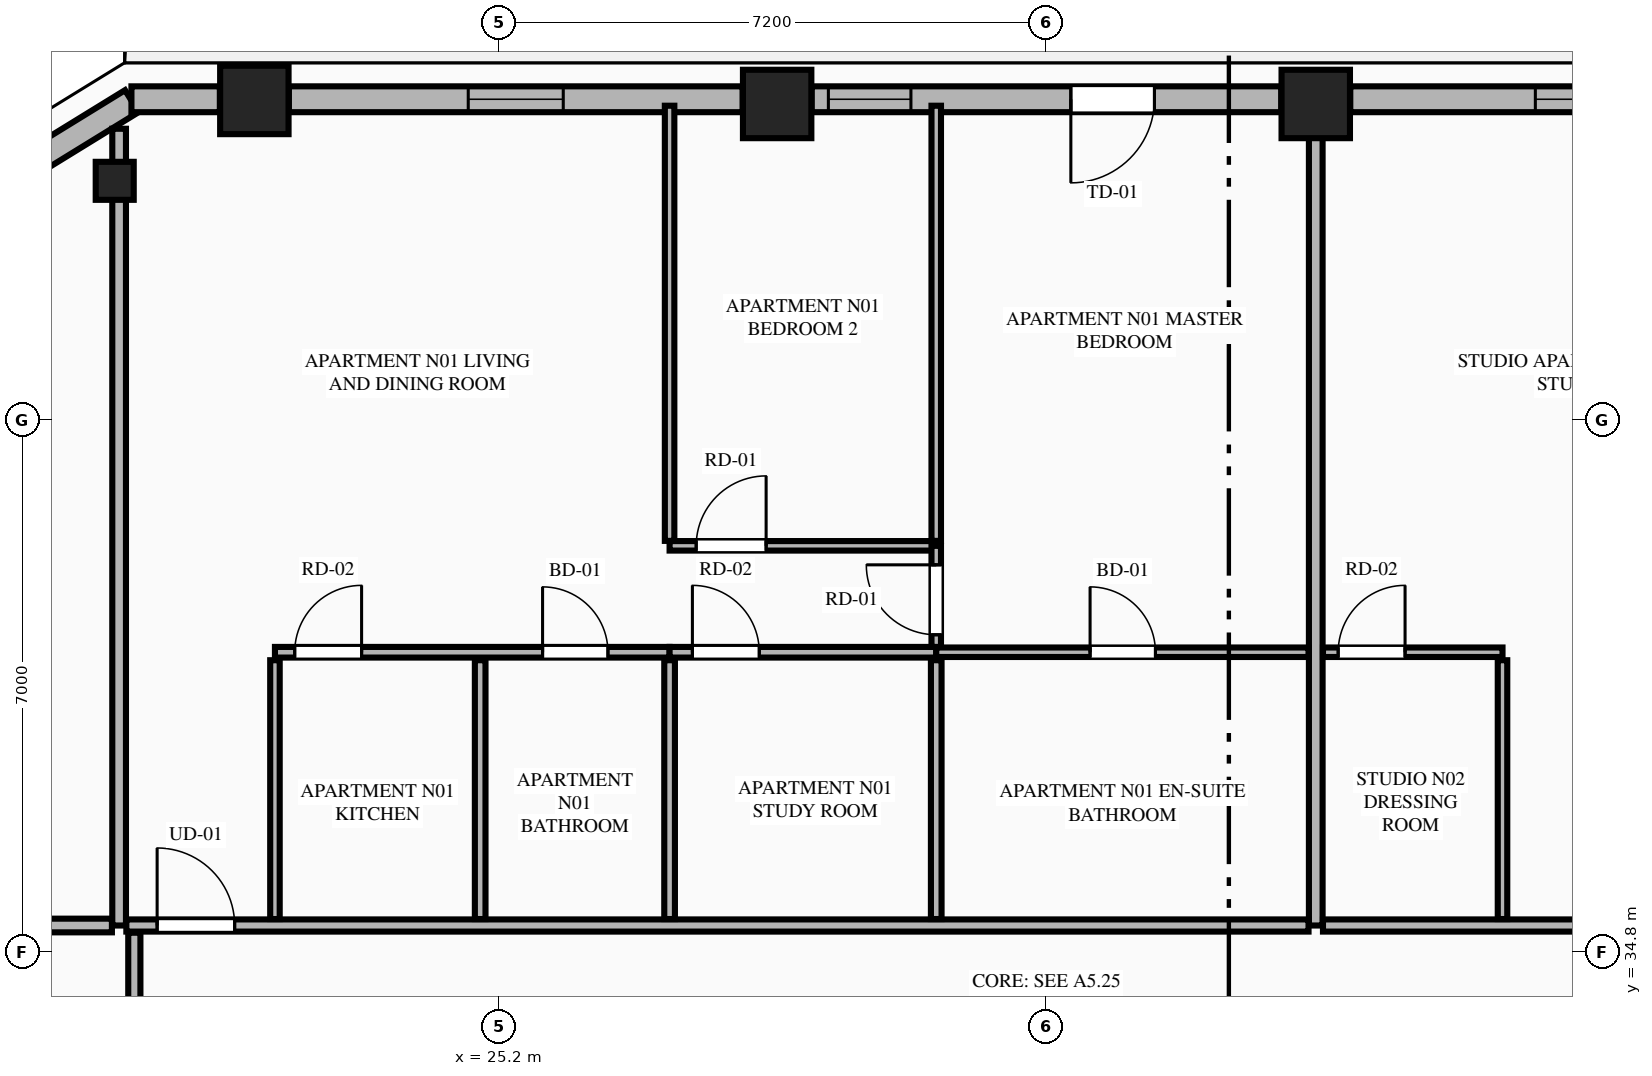
"""IFC4 building model, lengths in metres.
Left out: names, types, materials, properties, quantities, classifications, styles, units other than length and angle.
Written with IfcOpenShell. Run it as: python <this file> out.ifc"""

import sys

from ifc_helpers import new_model, si_unit, direction, frame, frame_2d, origin, origin_2d, place, context, subcontext, project, spatial, rectangle, extrude, element, fill, save


model = new_model("IFC4")
c1 = context("Model", 3, precision=1e-05, world=origin(), true_north=direction((0.0, 1.0)))
c2 = subcontext(c1, "Body", "Model", "MODEL_VIEW")
j1 = project(units=[si_unit("LENGTHUNIT", "METRE"), si_unit("PLANEANGLEUNIT", "RADIAN")], contexts=[c1])
p1 = place(None, origin())
s1 = spatial("IfcSite", under=j1, at=p1, CompositionType="ELEMENT")
p2 = place(p1, origin())
s2 = spatial("IfcBuilding", under=s1, at=p2, CompositionType="ELEMENT")
p3 = place(p2, frame((0.0, 0.0, 182.55)))
s3 = spatial("IfcBuildingStorey", under=s2, at=p3, CompositionType="ELEMENT", Elevation=182.55)
for number, where, z_axis, x_axis in (
    (1, (35.943, 45.958, 0.0), (0.0, 0.0, 1.0), (1.0, 0.0, 0.0)),
    (2, (28.857, 45.958, 0.0), (0.0, 0.0, 1.0), (1.0, 0.0, 0.0)),
    (3, (21.979, 46.011, 0.0), (0.0, 0.0, 1.0), (1.0, 0.0, 0.0)),
):
    element("IfcColumn", number, at=place(p3, frame(where, z_axis=z_axis, x_axis=x_axis)), inside=s3, PredefinedType="COLUMN", context=c2, shape_type="SweptSolid", body=[
        extrude(rectangle(XDim=0.9, YDim=0.9, at=origin_2d()), origin(), (0.0, 0.0, 1.0), 3.55),
    ])
p4 = place(p3, frame((20.142, 44.947, 0.0), z_axis=(0.0, 0.0, 1.0), x_axis=(-0.865230187018, -0.501374833306, 0.0)))
e4 = element("IfcColumn", 4, at=p4, inside=s3, PredefinedType="PILASTER", context=c2, shape_type="SweptSolid", body=[
    extrude(rectangle(XDim=0.5, YDim=0.35, at=origin_2d()), origin(), (0.0, 0.0, 1.0), 3.55),
])
p5 = place(p3, frame((20.367, 45.995, 0.0), z_axis=(0.0, 0.0, 1.0), x_axis=(-0.851713271379, -0.524008113828, 0.0)))
e5 = element("IfcWall", 5, at=p5, inside=s3, PredefinedType="STANDARD", context=c2, shape_type="SweptSolid", body=[
    extrude(rectangle(XDim=1.678, YDim=0.34, at=frame_2d((0.839, 0.0))), origin(), (0.0, 0.0, 1.0), 3.35),
])
p6 = place(p3, frame((42.367, 46.02, 0.0), z_axis=(0.0, 0.0, 1.0), x_axis=(-1.0, 0.0, 0.0)))
e6 = element("IfcWall", 6, at=p6, inside=s3, PredefinedType="STANDARD", context=c2, shape_type="SweptSolid", body=[
    extrude(rectangle(XDim=5.97, YDim=0.34, at=frame_2d((2.985, 0.0))), origin(), (0.0, 0.0, 1.0), 2.883),
])
p7 = place(p6, frame((2.435, 0.0, 0.75)))
e7 = element("IfcOpeningElement", 7, at=p7, cuts=e6, PredefinedType="OPENING", context=c2, shape_type="SweptSolid", body=[
    extrude(rectangle(XDim=1.1, YDim=1.983, at=frame_2d((0.55, 0.991))), frame((0.0, 0.18, 0.0), z_axis=(0.0, -1.0, 0.0), x_axis=(1.0, 0.0, 0.0)), (0.0, 0.0, 1.0), 0.36),
])
p8 = place(p3, frame((35.489, 46.02, 0.0), z_axis=(0.0, 0.0, 1.0), x_axis=(-1.0, 0.0, 0.0)))
e8 = element("IfcWall", 8, at=p8, inside=s3, PredefinedType="STANDARD", context=c2, shape_type="SweptSolid", body=[
    extrude(rectangle(XDim=6.178, YDim=0.34, at=frame_2d((3.089, 0.0))), origin(), (0.0, 0.0, 1.0), 2.883),
])
p9 = place(p8, frame((1.668, 0.0, 0.0)))
e9 = element("IfcOpeningElement", 9, at=p9, cuts=e8, PredefinedType="OPENING", context=c2, shape_type="SweptSolid", body=[
    extrude(rectangle(XDim=1.1, YDim=2.25, at=frame_2d((0.55, 1.125))), frame((0.0, 0.18, 0.0), z_axis=(0.0, -1.0, 0.0), x_axis=(1.0, 0.0, 0.0)), (0.0, 0.0, 1.0), 0.36),
])
p10 = place(p8, frame((4.872, 0.0, 0.75)))
e10 = element("IfcOpeningElement", 10, at=p10, cuts=e8, PredefinedType="OPENING", context=c2, shape_type="SweptSolid", body=[
    extrude(rectangle(XDim=1.086, YDim=1.983, at=frame_2d((0.543, 0.991))), frame((0.0, 0.18, 0.0), z_axis=(0.0, -1.0, 0.0), x_axis=(1.0, 0.0, 0.0)), (0.0, 0.0, 1.0), 0.36),
])
p11 = place(p3, frame((28.403, 46.02, 0.0), z_axis=(0.0, 0.0, 1.0), x_axis=(-1.0, 0.0, 0.0)))
e11 = element("IfcWall", 11, at=p11, inside=s3, PredefinedType="STANDARD", context=c2, shape_type="SweptSolid", body=[
    extrude(rectangle(XDim=5.97, YDim=0.34, at=frame_2d((2.985, 0.0))), origin(), (0.0, 0.0, 1.0), 2.883),
])
p12 = place(p11, frame((2.36, 0.0, 0.75)))
e12 = element("IfcOpeningElement", 12, at=p12, cuts=e11, PredefinedType="OPENING", context=c2, shape_type="SweptSolid", body=[
    extrude(rectangle(XDim=1.25, YDim=1.95, at=frame_2d((0.625, 0.975))), frame((0.0, 0.18, 0.0), z_axis=(0.0, -1.0, 0.0), x_axis=(1.0, 0.0, 0.0)), (0.0, 0.0, 1.0), 0.36),
])
p13 = place(p3, frame((21.525, 46.02, 0.0), z_axis=(0.0, 0.0, 1.0), x_axis=(-1.0, 0.0, 0.0)))
e13 = element("IfcWall", 13, at=p13, inside=s3, PredefinedType="STANDARD", context=c2, shape_type="SweptSolid", body=[
    extrude(rectangle(XDim=1.163, YDim=0.34, at=frame_2d((0.582, 0.0))), origin(), (0.0, 0.0, 1.0), 3.35),
])
p14 = place(p3, frame((20.2, 35.15, 0.0), z_axis=(0.0, 0.0, 1.0), x_axis=(0.0, 1.0, 0.0)))
e14 = element("IfcWall", 14, at=p14, inside=s3, PredefinedType="PARTITIONING", context=c2, shape_type="SweptSolid", body=[
    extrude(rectangle(XDim=10.482, YDim=0.18, at=frame_2d((5.241, 0.0))), origin(), (0.0, 0.0, 1.0), 3.35),
])
p15 = place(p3, frame((35.943, 35.15, 0.0), z_axis=(0.0, 0.0, 1.0), x_axis=(0.0, 1.0, 0.0)))
e15 = element("IfcWall", 15, at=p15, inside=s3, PredefinedType="PARTITIONING", context=c2, shape_type="SweptSolid", body=[
    extrude(rectangle(XDim=10.695, YDim=0.18, at=frame_2d((5.348, 0.0))), origin(), (0.0, 0.0, 1.0), 2.807),
])
p16 = place(p3, frame((20.295, 35.15, 0.0), z_axis=(0.0, 0.0, 1.0), x_axis=(1.0, 0.0, 0.0)))
e16 = element("IfcWall", 16, at=p16, inside=s3, PredefinedType="PARTITIONING", context=c2, shape_type="SweptSolid", body=[
    extrude(rectangle(XDim=15.553, YDim=0.16, at=frame_2d((7.776, 0.0))), origin(), (0.0, 0.0, 1.0), 3.35),
])
p17 = place(p16, frame((0.405, 0.0, 0.0)))
e17 = element("IfcOpeningElement", 17, at=p17, cuts=e16, PredefinedType="OPENING", context=c2, shape_type="SweptSolid", body=[
    extrude(rectangle(XDim=1.02, YDim=2.25, at=frame_2d((0.51, 1.125))), frame((0.0, 0.09, 0.0), z_axis=(0.0, -1.0, 0.0), x_axis=(1.0, 0.0, 0.0)), (0.0, 0.0, 1.0), 0.18),
])
p18 = place(p3, frame((22.25, 35.235, 0.0), z_axis=(0.0, 0.0, 1.0), x_axis=(0.0, 1.0, 0.0)))
e18 = element("IfcWall", 18, at=p18, inside=s3, PredefinedType="PARTITIONING", context=c2, shape_type="SweptSolid", body=[
    extrude(rectangle(XDim=3.405, YDim=0.125, at=frame_2d((1.702, 0.0))), origin(), (0.0, 0.0, 1.0), 2.807),
])
p19 = place(p3, frame((22.25, 38.745, 0.0), z_axis=(0.0, 0.0, 1.0), x_axis=(1.0, 0.0, 0.0)))
e19 = element("IfcWall", 19, at=p19, inside=s3, PredefinedType="PLUMBINGWALL", context=c2, shape_type="SweptSolid", body=[
    extrude(rectangle(XDim=5.192, YDim=0.14, at=frame_2d((2.596, 0.0))), origin(), (0.0, 0.0, 1.0), 3.35),
])
p20 = place(p19, frame((3.521, 0.0, 0.0)))
e20 = element("IfcOpeningElement", 20, at=p20, cuts=e19, PredefinedType="OPENING", context=c2, shape_type="SweptSolid", body=[
    extrude(rectangle(XDim=0.86, YDim=2.1, at=frame_2d((0.43, 1.05))), frame((0.0, 0.08, 0.0), z_axis=(0.0, -1.0, 0.0), x_axis=(1.0, 0.0, 0.0)), (0.0, 0.0, 1.0), 0.16),
])
p21 = place(p19, frame((0.26, 0.0, 0.0)))
e21 = element("IfcOpeningElement", 21, at=p21, cuts=e19, PredefinedType="OPENING", context=c2, shape_type="SweptSolid", body=[
    extrude(rectangle(XDim=0.88, YDim=2.15, at=frame_2d((0.44, 1.075))), frame((0.0, 0.08, 0.0), z_axis=(0.0, -1.0, 0.0), x_axis=(1.0, 0.0, 0.0)), (0.0, 0.0, 1.0), 0.16),
])
p22 = place(p3, frame((27.442, 38.745, 0.0), z_axis=(0.0, 0.0, 1.0), x_axis=(1.0, 0.0, 0.0)))
e22 = element("IfcWall", 22, at=p22, inside=s3, PredefinedType="PLUMBINGWALL", context=c2, shape_type="SweptSolid", body=[
    extrude(rectangle(XDim=3.508, YDim=0.14, at=frame_2d((1.754, 0.0))), origin(), (0.0, 0.0, 1.0), 3.35),
])
p23 = place(p22, frame((0.3, 0.0, 0.0)))
e23 = element("IfcOpeningElement", 23, at=p23, cuts=e22, PredefinedType="OPENING", context=c2, shape_type="SweptSolid", body=[
    extrude(rectangle(XDim=0.88, YDim=2.15, at=frame_2d((0.44, 1.075))), frame((0.0, 0.08, 0.0), z_axis=(0.0, -1.0, 0.0), x_axis=(1.0, 0.0, 0.0)), (0.0, 0.0, 1.0), 0.16),
])
p24 = place(p3, frame((30.95, 38.745, 0.0), z_axis=(0.0, 0.0, 1.0), x_axis=(1.0, 0.0, 0.0)))
e24 = element("IfcWall", 24, at=p24, inside=s3, PredefinedType="PARTITIONING", context=c2, shape_type="SweptSolid", body=[
    extrude(rectangle(XDim=4.898, YDim=0.125, at=frame_2d((2.449, 0.0))), origin(), (0.0, 0.0, 1.0), 3.35),
])
p25 = place(p24, frame((2.024, 0.0, 0.0)))
e25 = element("IfcOpeningElement", 25, at=p25, cuts=e24, PredefinedType="OPENING", context=c2, shape_type="SweptSolid", body=[
    extrude(rectangle(XDim=0.86, YDim=2.1, at=frame_2d((0.43, 1.05))), frame((0.0, 0.073, 0.0), z_axis=(0.0, -1.0, 0.0), x_axis=(1.0, 0.0, 0.0)), (0.0, 0.0, 1.0), 0.145),
])
p26 = place(p3, frame((24.95, 35.235, 0.0), z_axis=(0.0, 0.0, 1.0), x_axis=(0.0, 1.0, 0.0)))
e26 = element("IfcWall", 26, at=p26, inside=s3, PredefinedType="PLUMBINGWALL", context=c2, shape_type="SweptSolid", body=[
    extrude(rectangle(XDim=3.405, YDim=0.14, at=frame_2d((1.702, 0.0))), origin(), (0.0, 0.0, 1.0), 3.35),
])
p27 = place(p3, frame((27.442, 40.21, 0.0), z_axis=(0.0, 0.0, 1.0), x_axis=(0.0, 1.0, 0.0)))
e27 = element("IfcWall", 27, at=p27, inside=s3, PredefinedType="PARTITIONING", context=c2, shape_type="SweptSolid", body=[
    extrude(rectangle(XDim=5.725, YDim=0.125, at=frame_2d((2.863, 0.0))), origin(), (0.0, 0.0, 1.0), 3.35),
])
p28 = place(p3, frame((27.442, 40.145, 0.0), z_axis=(0.0, 0.0, 1.0), x_axis=(1.0, 0.0, 0.0)))
e28 = element("IfcWall", 28, at=p28, inside=s3, PredefinedType="PARTITIONING", context=c2, shape_type="SweptSolid", body=[
    extrude(rectangle(XDim=3.508, YDim=0.125, at=frame_2d((1.754, 0.0))), origin(), (0.0, 0.0, 1.0), 3.35),
])
p29 = place(p28, frame((0.35, 0.0, 0.0)))
e29 = element("IfcOpeningElement", 29, at=p29, cuts=e28, PredefinedType="OPENING", context=c2, shape_type="SweptSolid", body=[
    extrude(rectangle(XDim=0.92, YDim=2.15, at=frame_2d((0.46, 1.075))), frame((0.0, 0.073, 0.0), z_axis=(0.0, -1.0, 0.0), x_axis=(1.0, 0.0, 0.0)), (0.0, 0.0, 1.0), 0.145),
])
p30 = place(p3, frame((30.95, 38.815, 0.0), z_axis=(0.0, 0.0, 1.0), x_axis=(0.0, 1.0, 0.0)))
e30 = element("IfcWall", 30, at=p30, inside=s3, PredefinedType="PARTITIONING", context=c2, shape_type="SweptSolid", body=[
    extrude(rectangle(XDim=1.33, YDim=0.125, at=frame_2d((0.665, 0.0))), origin(), (0.0, 0.0, 1.0), 3.35),
])
p31 = place(p30, frame((0.16, 0.0, 0.0)))
e31 = element("IfcOpeningElement", 31, at=p31, cuts=e30, PredefinedType="OPENING", context=c2, shape_type="SweptSolid", body=[
    extrude(rectangle(XDim=0.92, YDim=2.15, at=frame_2d((0.46, 1.075))), frame((0.0, 0.073, 0.0), z_axis=(0.0, -1.0, 0.0), x_axis=(1.0, 0.0, 0.0)), (0.0, 0.0, 1.0), 0.145),
])
for number, where, z_axis, x_axis in (
    (32, (27.442, 35.235, 0.0), (0.0, 0.0, 1.0), (0.0, 1.0, 0.0)),
    (33, (30.95, 35.235, 0.0), (0.0, 0.0, 1.0), (0.0, 1.0, 0.0)),
):
    element("IfcWall", number, at=place(p3, frame(where, z_axis=z_axis, x_axis=x_axis)), inside=s3, PredefinedType="PLUMBINGWALL", context=c2, shape_type="SweptSolid", body=[
        extrude(rectangle(XDim=3.405, YDim=0.14, at=frame_2d((1.702, 0.0))), origin(), (0.0, 0.0, 1.0), 3.35),
    ])
p32 = place(p3, frame((30.95, 40.21, 0.0), z_axis=(0.0, 0.0, 1.0), x_axis=(0.0, 1.0, 0.0)))
e34 = element("IfcWall", 34, at=p32, inside=s3, PredefinedType="PARTITIONING", context=c2, shape_type="SweptSolid", body=[
    extrude(rectangle(XDim=5.725, YDim=0.125, at=frame_2d((2.863, 0.0))), origin(), (0.0, 0.0, 1.0), 3.35),
])
p33 = place(p3, frame((36.038, 35.15, 0.0), z_axis=(0.0, 0.0, 1.0), x_axis=(1.0, 0.0, 0.0)))
e35 = element("IfcWall", 35, at=p33, inside=s3, PredefinedType="PARTITIONING", context=c2, shape_type="SweptSolid", body=[
    extrude(rectangle(XDim=8.467, YDim=0.16, at=frame_2d((4.233, 0.0))), origin(), (0.0, 0.0, 1.0), 3.35),
])
p34 = place(p33, frame((6.212, 0.0, 0.0)))
e36 = element("IfcOpeningElement", 36, at=p34, cuts=e35, PredefinedType="OPENING", context=c2, shape_type="SweptSolid", body=[
    extrude(rectangle(XDim=1.02, YDim=2.25, at=frame_2d((0.51, 1.125))), frame((0.0, 0.09, 0.0), z_axis=(0.0, -1.0, 0.0), x_axis=(1.0, 0.0, 0.0)), (0.0, 0.0, 1.0), 0.18),
])
p35 = place(p3, frame((38.4, 35.235, 0.0), z_axis=(0.0, 0.0, 1.0), x_axis=(0.0, 1.0, 0.0)))
e37 = element("IfcWall", 37, at=p35, inside=s3, PredefinedType="PARTITIONING", context=c2, shape_type="SweptSolid", body=[
    extrude(rectangle(XDim=3.405, YDim=0.125, at=frame_2d((1.702, 0.0))), origin(), (0.0, 0.0, 1.0), 3.35),
])
p36 = place(p3, frame((36.038, 38.745, 0.0), z_axis=(0.0, 0.0, 1.0), x_axis=(1.0, 0.0, 0.0)))
e38 = element("IfcWall", 38, at=p36, inside=s3, PredefinedType="PARTITIONING", context=c2, shape_type="SweptSolid", body=[
    extrude(rectangle(XDim=2.362, YDim=0.125, at=frame_2d((1.181, 0.0))), origin(), (0.0, 0.0, 1.0), 3.35),
])
p37 = place(p36, frame((0.2, 0.0, 0.0)))
e39 = element("IfcOpeningElement", 39, at=p37, cuts=e38, PredefinedType="OPENING", context=c2, shape_type="SweptSolid", body=[
    extrude(rectangle(XDim=0.88, YDim=2.15, at=frame_2d((0.44, 1.075))), frame((0.0, 0.073, 0.0), z_axis=(0.0, -1.0, 0.0), x_axis=(1.0, 0.0, 0.0)), (0.0, 0.0, 1.0), 0.145),
])
p38 = place(p3, frame((14.11, 35.15, 0.0), z_axis=(0.0, 0.0, 1.0), x_axis=(1.0, 0.0, 0.0)))
e40 = element("IfcWall", 40, at=p38, inside=s3, PredefinedType="PARTITIONING", context=c2, shape_type="SweptSolid", body=[
    extrude(rectangle(XDim=5.995, YDim=0.18, at=frame_2d((2.998, 0.0))), origin(), (0.0, 0.0, 1.0), 3.35),
])
p39 = place(p3, frame((20.4, 16.345, 0.0), z_axis=(0.0, 0.0, 1.0), x_axis=(0.0, 1.0, 0.0)))
e41 = element("IfcWall", 41, at=p39, inside=s3, PredefinedType="PARTITIONING", context=c2, shape_type="SweptSolid", body=[
    extrude(rectangle(XDim=18.71, YDim=0.16, at=frame_2d((9.355, 0.0))), origin(), (0.0, 0.0, 1.0), 3.35),
])
p40 = place(p39, frame((0.45, 0.0, 0.0)))
e42 = element("IfcOpeningElement", 42, at=p40, cuts=e41, PredefinedType="OPENING", context=c2, shape_type="SweptSolid", body=[
    extrude(rectangle(XDim=1.02, YDim=2.25, at=frame_2d((0.51, 1.125))), frame((0.0, 0.09, 0.0), z_axis=(0.0, -1.0, 0.0), x_axis=(1.0, 0.0, 0.0)), (0.0, 0.0, 1.0), 0.18),
])
p41 = place(p7, origin())
e43 = element("IfcWindow", 43, at=p41, inside=s3, PartitioningType="SINGLE_PANEL", PredefinedType="WINDOW", context=c2, shape_type="SweptSolid", body=[
    extrude(rectangle(XDim=1.1, YDim=1.983, at=frame_2d((0.55, 0.991))), frame((0.0, 0.03, 0.0), z_axis=(0.0, -1.0, 0.0), x_axis=(1.0, 0.0, 0.0)), (0.0, 0.0, 1.0), 0.06),
])
fill(e7, e43)
p42 = place(p9, origin())
e44 = element("IfcDoor", 44, at=p42, inside=s3, OperationType="SINGLE_SWING_RIGHT", PredefinedType="DOOR", context=c2, shape_type="SweptSolid", body=[
    extrude(rectangle(XDim=1.1, YDim=2.25, at=frame_2d((0.55, 1.125))), frame((0.0, 0.025, 0.0), z_axis=(0.0, -1.0, 0.0), x_axis=(1.0, 0.0, 0.0)), (0.0, 0.0, 1.0), 0.05),
])
fill(e9, e44)
p43 = place(p12, origin())
e45 = element("IfcWindow", 45, at=p43, inside=s3, PartitioningType="SINGLE_PANEL", PredefinedType="WINDOW", context=c2, shape_type="SweptSolid", body=[
    extrude(rectangle(XDim=1.25, YDim=1.95, at=frame_2d((0.625, 0.975))), frame((0.0, 0.03, 0.0), z_axis=(0.0, -1.0, 0.0), x_axis=(1.0, 0.0, 0.0)), (0.0, 0.0, 1.0), 0.06),
])
fill(e12, e45)
p44 = place(p20, origin())
e46 = element("IfcDoor", 46, at=p44, inside=s3, OperationType="SINGLE_SWING_LEFT", PredefinedType="DOOR", context=c2, shape_type="SweptSolid", body=[
    extrude(rectangle(XDim=0.86, YDim=2.1, at=frame_2d((0.43, 1.05))), frame((0.0, 0.025, 0.0), z_axis=(0.0, -1.0, 0.0), x_axis=(1.0, 0.0, 0.0)), (0.0, 0.0, 1.0), 0.05),
])
fill(e20, e46)
p45 = place(p25, origin())
e47 = element("IfcDoor", 47, at=p45, inside=s3, OperationType="SINGLE_SWING_LEFT", PredefinedType="DOOR", context=c2, shape_type="SweptSolid", body=[
    extrude(rectangle(XDim=0.86, YDim=2.1, at=frame_2d((0.43, 1.05))), frame((0.0, 0.025, 0.0), z_axis=(0.0, -1.0, 0.0), x_axis=(1.0, 0.0, 0.0)), (0.0, 0.0, 1.0), 0.05),
])
fill(e25, e47)
p46 = place(p17, origin())
e48 = element("IfcDoor", 48, at=p46, inside=s3, OperationType="SINGLE_SWING_LEFT", PredefinedType="DOOR", context=c2, shape_type="SweptSolid", body=[
    extrude(rectangle(XDim=1.02, YDim=2.25, at=frame_2d((0.51, 1.125))), frame((0.0, 0.025, 0.0), z_axis=(0.0, -1.0, 0.0), x_axis=(1.0, 0.0, 0.0)), (0.0, 0.0, 1.0), 0.05),
])
fill(e17, e48)
p47 = place(p21, origin())
e49 = element("IfcDoor", 49, at=p47, inside=s3, OperationType="SINGLE_SWING_RIGHT", PredefinedType="DOOR", context=c2, shape_type="SweptSolid", body=[
    extrude(rectangle(XDim=0.88, YDim=2.15, at=frame_2d((0.44, 1.075))), frame((0.0, 0.025, 0.0), z_axis=(0.0, -1.0, 0.0), x_axis=(1.0, 0.0, 0.0)), (0.0, 0.0, 1.0), 0.05),
])
fill(e21, e49)
p48 = place(p23, origin())
e50 = element("IfcDoor", 50, at=p48, inside=s3, OperationType="SINGLE_SWING_LEFT", PredefinedType="DOOR", context=c2, shape_type="SweptSolid", body=[
    extrude(rectangle(XDim=0.88, YDim=2.15, at=frame_2d((0.44, 1.075))), frame((0.0, 0.025, 0.0), z_axis=(0.0, -1.0, 0.0), x_axis=(1.0, 0.0, 0.0)), (0.0, 0.0, 1.0), 0.05),
])
fill(e23, e50)
p49 = place(p29, origin())
e51 = element("IfcDoor", 51, at=p49, inside=s3, OperationType="SINGLE_SWING_RIGHT", PredefinedType="DOOR", context=c2, shape_type="SweptSolid", body=[
    extrude(rectangle(XDim=0.92, YDim=2.15, at=frame_2d((0.46, 1.075))), frame((0.0, 0.025, 0.0), z_axis=(0.0, -1.0, 0.0), x_axis=(1.0, 0.0, 0.0)), (0.0, 0.0, 1.0), 0.05),
])
fill(e29, e51)
p50 = place(p31, origin())
e52 = element("IfcDoor", 52, at=p50, inside=s3, OperationType="SINGLE_SWING_RIGHT", PredefinedType="DOOR", context=c2, shape_type="SweptSolid", body=[
    extrude(rectangle(XDim=0.92, YDim=2.15, at=frame_2d((0.46, 1.075))), frame((0.0, 0.025, 0.0), z_axis=(0.0, -1.0, 0.0), x_axis=(1.0, 0.0, 0.0)), (0.0, 0.0, 1.0), 0.05),
])
fill(e31, e52)
p51 = place(p37, origin())
e53 = element("IfcDoor", 53, at=p51, inside=s3, OperationType="SINGLE_SWING_RIGHT", PredefinedType="DOOR", context=c2, shape_type="SweptSolid", body=[
    extrude(rectangle(XDim=0.88, YDim=2.15, at=frame_2d((0.44, 1.075))), frame((0.0, 0.025, 0.0), z_axis=(0.0, -1.0, 0.0), x_axis=(1.0, 0.0, 0.0)), (0.0, 0.0, 1.0), 0.05),
])
fill(e39, e53)
p52 = place(p10, origin())
e54 = element("IfcWindow", 54, at=p52, inside=s3, PartitioningType="SINGLE_PANEL", PredefinedType="WINDOW", context=c2, shape_type="SweptSolid", body=[
    extrude(rectangle(XDim=1.086, YDim=1.983, at=frame_2d((0.543, 0.991))), frame((0.0, 0.03, 0.0), z_axis=(0.0, -1.0, 0.0), x_axis=(1.0, 0.0, 0.0)), (0.0, 0.0, 1.0), 0.06),
])
fill(e10, e54)
save(model, sys.argv[1])
